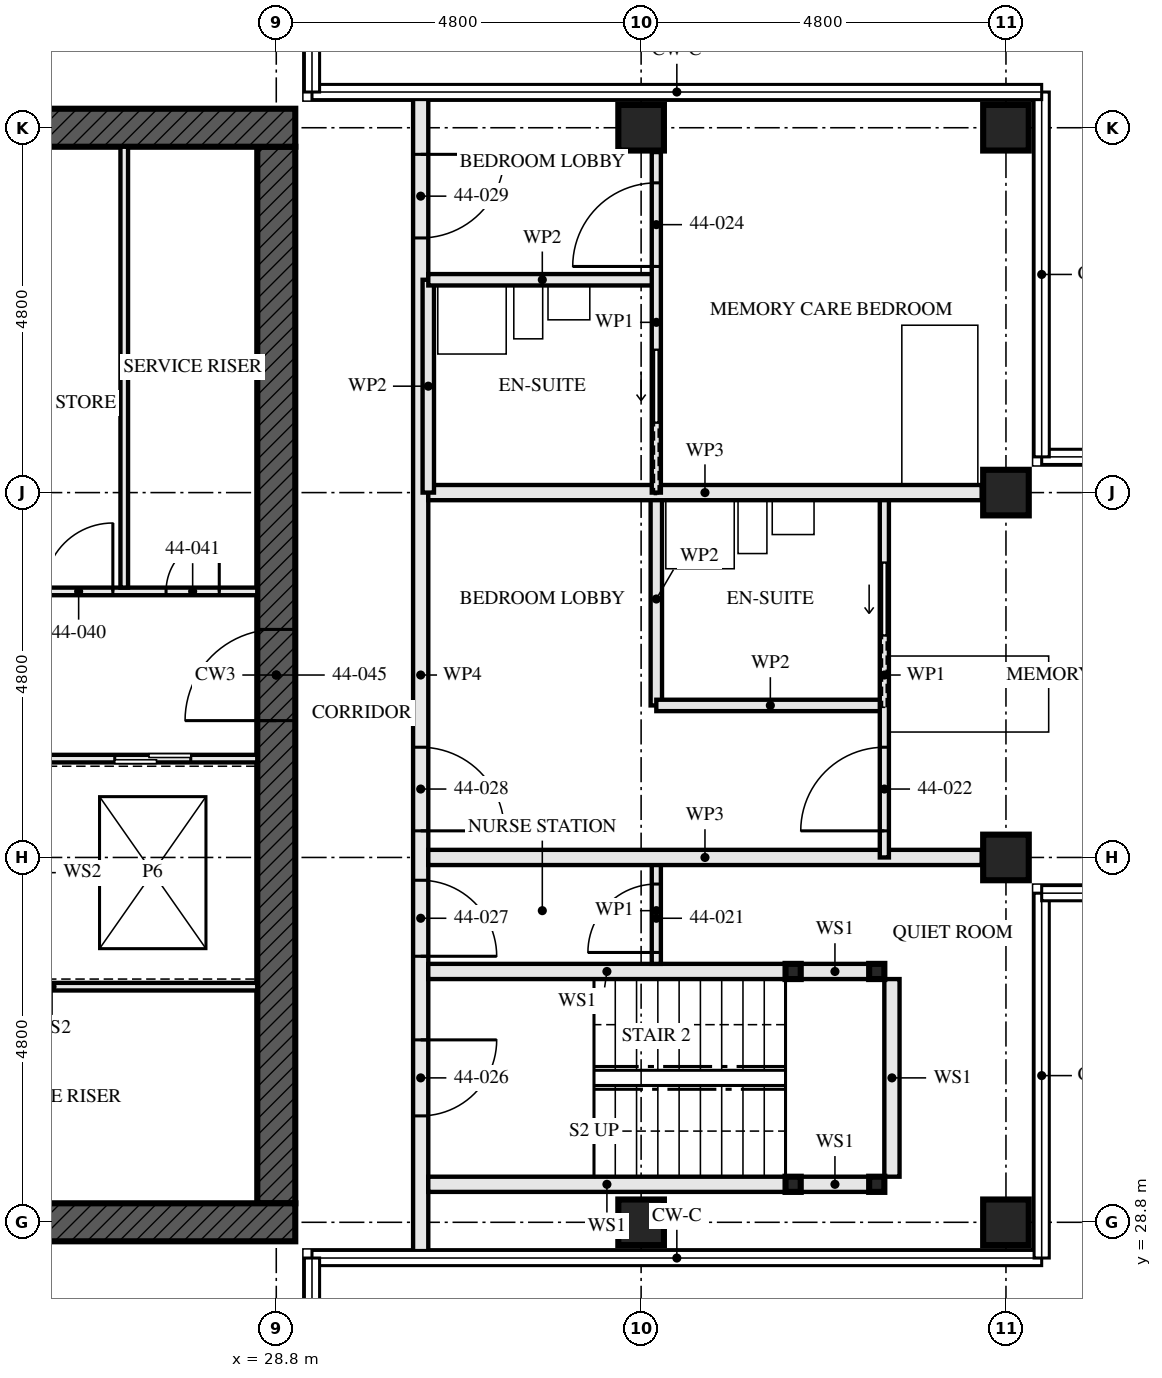
"""IFC4 building model, lengths in metres.
Left out: names, types, materials, properties, quantities, classifications, styles, units other than length and angle.
Written with IfcOpenShell. Run it as: python <this file> out.ifc"""

import sys

from ifc_helpers import new_model, si_unit, direction, frame, frame_2d, origin, origin_2d, place, context, subcontext, project, spatial, rectangle, hollow_rectangle, extrude, element, fill, save


model = new_model("IFC4")
c1 = context("Model", 3, precision=1e-05, world=origin(), true_north=direction((0.0, 1.0)))
c2 = subcontext(c1, "Body", "Model", "MODEL_VIEW")
j1 = project(units=[si_unit("LENGTHUNIT", "METRE"), si_unit("PLANEANGLEUNIT", "RADIAN")], contexts=[c1])
p1 = place(None, origin())
s1 = spatial("IfcSite", under=j1, at=p1, CompositionType="ELEMENT")
p2 = place(p1, origin())
s2 = spatial("IfcBuilding", under=s1, at=p2, CompositionType="ELEMENT")
p3 = place(p2, frame((0.0, 0.0, 162.0)))
s3 = spatial("IfcBuildingStorey", under=s2, at=p3, CompositionType="ELEMENT", Elevation=162.0)
for number, where, z_axis, x_axis in (
    (1, (33.6, 28.8, 0.0), (0.0, 0.0, 1.0), (0.0, 1.0, 0.0)),
    (2, (33.6, 43.2, 0.0), (0.0, 0.0, 1.0), (0.0, 1.0, 0.0)),
):
    element("IfcColumn", number, at=place(p3, frame(where, z_axis=z_axis, x_axis=x_axis)), inside=s3, PredefinedType="COLUMN", context=c2, shape_type="SweptSolid", body=[
        extrude(hollow_rectangle(XDim=0.6, YDim=0.6, WallThickness=0.08, at=origin_2d()), origin(), (0.0, 0.0, 1.0), 3.5),
    ])
for number, where, z_axis, x_axis in (
    (3, (38.4, 28.8, 0.0), (0.0, 0.0, 1.0), (0.0, 1.0, 0.0)),
    (4, (38.4, 33.6, 0.0), (0.0, 0.0, 1.0), (0.0, 1.0, 0.0)),
    (5, (38.4, 38.4, 0.0), (0.0, 0.0, 1.0), (0.0, 1.0, 0.0)),
    (6, (38.4, 43.2, 0.0), (0.0, 0.0, 1.0), (0.0, 1.0, 0.0)),
):
    element("IfcColumn", number, at=place(p3, frame(where, z_axis=z_axis, x_axis=x_axis)), inside=s3, PredefinedType="COLUMN", context=c2, shape_type="SweptSolid", body=[
        extrude(hollow_rectangle(XDim=0.6, YDim=0.6, WallThickness=0.06, at=origin_2d()), origin(), (0.0, 0.0, 1.0), 3.5),
    ])
p4 = place(p3, frame((14.15, 28.8, -0.17), z_axis=(0.0, 0.0, 1.0), x_axis=(1.0, 0.0, 0.0)))
e7 = element("IfcWall", 7, at=p4, inside=s3, PredefinedType="SHEAR", context=c2, shape_type="SweptSolid", body=[
    extrude(rectangle(XDim=14.9, YDim=0.5, at=frame_2d((7.45, 0.0))), origin(), (0.0, 0.0, 1.0), 3.5),
])
p5 = place(p4, frame((6.85, 0.0, 0.17)))
e8 = element("IfcOpeningElement", 8, at=p5, cuts=e7, PredefinedType="OPENING", context=c2, shape_type="SweptSolid", body=[
    extrude(rectangle(XDim=1.2, YDim=2.1, at=frame_2d((0.6, 1.05))), frame((0.0, 0.26, 0.0), z_axis=(0.0, -1.0, 0.0), x_axis=(1.0, 0.0, 0.0)), (0.0, 0.0, 1.0), 0.521),
])
p6 = place(p3, frame((29.05, 43.2, -0.17), z_axis=(0.0, 0.0, 1.0), x_axis=(-1.0, 0.0, 0.0)))
e9 = element("IfcWall", 9, at=p6, inside=s3, PredefinedType="SHEAR", context=c2, shape_type="SweptSolid", body=[
    extrude(rectangle(XDim=14.9, YDim=0.5, at=frame_2d((7.45, 0.0))), origin(), (0.0, 0.0, 1.0), 3.5),
])
p7 = place(p6, frame((6.85, 0.0, 0.17)))
e10 = element("IfcOpeningElement", 10, at=p7, cuts=e9, PredefinedType="OPENING", context=c2, shape_type="SweptSolid", body=[
    extrude(rectangle(XDim=1.2, YDim=2.1, at=frame_2d((0.6, 1.05))), frame((0.0, 0.26, 0.0), z_axis=(0.0, -1.0, 0.0), x_axis=(1.0, 0.0, 0.0)), (0.0, 0.0, 1.0), 0.521),
])
p8 = place(p3, frame((28.8, 29.05, -0.17), z_axis=(0.0, 0.0, 1.0), x_axis=(0.0, 1.0, 0.0)))
e11 = element("IfcWall", 11, at=p8, inside=s3, PredefinedType="SHEAR", context=c2, shape_type="SweptSolid", body=[
    extrude(rectangle(XDim=13.9, YDim=0.5, at=frame_2d((6.95, 0.0))), origin(), (0.0, 0.0, 1.0), 3.5),
])
p9 = place(p8, frame((6.35, 0.0, 0.17)))
e12 = element("IfcOpeningElement", 12, at=p9, cuts=e11, PredefinedType="OPENING", context=c2, shape_type="SweptSolid", body=[
    extrude(rectangle(XDim=1.2, YDim=2.1, at=frame_2d((0.6, 1.05))), frame((0.0, 0.26, 0.0), z_axis=(0.0, -1.0, 0.0), x_axis=(1.0, 0.0, 0.0)), (0.0, 0.0, 1.0), 0.521),
])
for number, where, z_axis, x_axis in (
    (13, (36.7, 29.3, 0.0), (0.0, 0.0, 1.0), (1.0, 0.0, 0.0)),
    (14, (36.7, 32.1, 0.0), (0.0, 0.0, 1.0), (1.0, 0.0, 0.0)),
    (15, (35.6, 29.3, 0.0), (0.0, 0.0, 1.0), (1.0, 0.0, 0.0)),
    (16, (35.6, 32.1, 0.0), (0.0, 0.0, 1.0), (1.0, 0.0, 0.0)),
):
    element("IfcColumn", number, at=place(p3, frame(where, z_axis=z_axis, x_axis=x_axis)), inside=s3, PredefinedType="COLUMN", context=c2, shape_type="SweptSolid", body=[
        extrude(hollow_rectangle(XDim=0.2, YDim=0.2, WallThickness=0.008, at=origin_2d()), origin(), (0.0, 0.0, 1.0), 3.33),
    ])
p10 = place(p3, frame((36.6, 29.3, 0.0), z_axis=(0.0, 0.0, 1.0), x_axis=(-1.0, 0.0, 0.0)))
e17 = element("IfcWall", 17, at=p10, inside=s3, PredefinedType="SOLIDWALL", context=c2, shape_type="SweptSolid", body=[
    extrude(rectangle(XDim=0.9, YDim=0.2, at=frame_2d((0.45, 0.0))), origin(), (0.0, 0.0, 1.0), 2.99),
])
p11 = place(p3, frame((35.5, 29.3, 0.0), z_axis=(0.0, 0.0, 1.0), x_axis=(-1.0, 0.0, 0.0)))
e18 = element("IfcWall", 18, at=p11, inside=s3, PredefinedType="SOLIDWALL", context=c2, shape_type="SweptSolid", body=[
    extrude(rectangle(XDim=4.7, YDim=0.2, at=frame_2d((2.35, 0.0))), origin(), (0.0, 0.0, 1.0), 2.99),
])
p12 = place(p3, frame((36.6, 32.1, 0.0), z_axis=(0.0, 0.0, 1.0), x_axis=(-1.0, 0.0, 0.0)))
e19 = element("IfcWall", 19, at=p12, inside=s3, PredefinedType="SOLIDWALL", context=c2, shape_type="SweptSolid", body=[
    extrude(rectangle(XDim=0.9, YDim=0.2, at=frame_2d((0.45, 0.0))), origin(), (0.0, 0.0, 1.0), 2.99),
])
p13 = place(p3, frame((35.5, 32.1, 0.0), z_axis=(0.0, 0.0, 1.0), x_axis=(-1.0, 0.0, 0.0)))
e20 = element("IfcWall", 20, at=p13, inside=s3, PredefinedType="SOLIDWALL", context=c2, shape_type="SweptSolid", body=[
    extrude(rectangle(XDim=4.7, YDim=0.2, at=frame_2d((2.35, 0.0))), origin(), (0.0, 0.0, 1.0), 2.99),
])
p14 = place(p3, frame((36.9, 29.4, 0.0), z_axis=(0.0, 0.0, 1.0), x_axis=(0.0, 1.0, 0.0)))
e21 = element("IfcWall", 21, at=p14, inside=s3, PredefinedType="SOLIDWALL", context=c2, shape_type="SweptSolid", body=[
    extrude(rectangle(XDim=2.6, YDim=0.2, at=frame_2d((1.3, 0.0))), origin(), (0.0, 0.0, 1.0), 3.33),
])
p15 = place(p3, frame((33.8, 32.2, 0.0), z_axis=(0.0, 0.0, 1.0), x_axis=(0.0, 1.0, 0.0)))
e22 = element("IfcWall", 22, at=p15, inside=s3, PredefinedType="PARTITIONING", context=c2, shape_type="SweptSolid", body=[
    extrude(rectangle(XDim=1.4, YDim=0.12, at=frame_2d((0.7, 0.0))), origin(), (0.0, 0.0, 1.0), 3.33),
])
p16 = place(p15, frame((0.15, 0.0, 0.0)))
e23 = element("IfcOpeningElement", 23, at=p16, cuts=e22, PredefinedType="OPENING", context=c2, shape_type="SweptSolid", body=[
    extrude(rectangle(XDim=0.9, YDim=2.1, at=frame_2d((0.45, 1.05))), frame((0.0, 0.071, 0.0), z_axis=(0.0, -1.0, 0.0), x_axis=(1.0, 0.0, 0.0)), (0.0, 0.0, 1.0), 0.141),
])
p17 = place(p3, frame((38.08, 33.6, 0.0), z_axis=(0.0, 0.0, 1.0), x_axis=(-1.0, 0.0, 0.0)))
e24 = element("IfcWall", 24, at=p17, inside=s3, PredefinedType="PARTITIONING", context=c2, shape_type="SweptSolid", body=[
    extrude(rectangle(XDim=7.28, YDim=0.2, at=frame_2d((3.64, 0.0))), origin(), (0.0, 0.0, 1.0), 2.55),
])
p18 = place(p3, frame((36.8, 35.6, 0.0), z_axis=(0.0, 0.0, 1.0), x_axis=(-1.0, 0.0, 0.0)))
e25 = element("IfcWall", 25, at=p18, inside=s3, PredefinedType="PARTITIONING", context=c2, shape_type="SweptSolid", body=[
    extrude(rectangle(XDim=3.0, YDim=0.15, at=frame_2d((1.5, 0.0))), origin(), (0.0, 0.0, 1.0), 3.33),
])
p19 = place(p3, frame((33.8, 35.6, 0.0), z_axis=(0.0, 0.0, 1.0), x_axis=(0.0, 1.0, 0.0)))
e26 = element("IfcWall", 26, at=p19, inside=s3, PredefinedType="PARTITIONING", context=c2, shape_type="SweptSolid", body=[
    extrude(rectangle(XDim=2.8, YDim=0.15, at=frame_2d((1.4, 0.0))), origin(), (0.0, 0.0, 1.0), 3.33),
])
p20 = place(p3, frame((36.8, 33.6, 0.0), z_axis=(0.0, 0.0, 1.0), x_axis=(0.0, 1.0, 0.0)))
e27 = element("IfcWall", 27, at=p20, inside=s3, PredefinedType="PARTITIONING", context=c2, shape_type="SweptSolid", body=[
    extrude(rectangle(XDim=4.8, YDim=0.12, at=frame_2d((2.4, 0.0))), origin(), (0.0, 0.0, 1.0), 3.33),
])
p21 = place(p20, frame((0.35, 0.0, 0.0)))
e28 = element("IfcOpeningElement", 28, at=p21, cuts=e27, PredefinedType="OPENING", context=c2, shape_type="SweptSolid", body=[
    extrude(rectangle(XDim=1.1, YDim=2.1, at=frame_2d((0.55, 1.05))), frame((0.0, 0.071, 0.0), z_axis=(0.0, -1.0, 0.0), x_axis=(1.0, 0.0, 0.0)), (0.0, 0.0, 1.0), 0.141),
])
p22 = place(p20, frame((2.925, 0.0, 0.0)))
e29 = element("IfcOpeningElement", 29, at=p22, cuts=e27, PredefinedType="OPENING", context=c2, shape_type="SweptSolid", body=[
    extrude(rectangle(XDim=0.95, YDim=2.1, at=frame_2d((0.475, 1.05))), frame((0.0, 0.071, 0.0), z_axis=(0.0, -1.0, 0.0), x_axis=(1.0, 0.0, 0.0)), (0.0, 0.0, 1.0), 0.141),
])
p23 = place(p3, frame((38.08, 38.4, 0.0), z_axis=(0.0, 0.0, 1.0), x_axis=(-1.0, 0.0, 0.0)))
e30 = element("IfcWall", 30, at=p23, inside=s3, PredefinedType="PARTITIONING", context=c2, shape_type="SweptSolid", body=[
    extrude(rectangle(XDim=7.28, YDim=0.2, at=frame_2d((3.64, 0.0))), origin(), (0.0, 0.0, 1.0), 2.55),
])
p24 = place(p3, frame((33.8, 41.2, 0.0), z_axis=(0.0, 0.0, 1.0), x_axis=(-1.0, 0.0, 0.0)))
e31 = element("IfcWall", 31, at=p24, inside=s3, PredefinedType="PARTITIONING", context=c2, shape_type="SweptSolid", body=[
    extrude(rectangle(XDim=3.0, YDim=0.15, at=frame_2d((1.5, 0.0))), origin(), (0.0, 0.0, 1.0), 3.33),
])
p25 = place(p3, frame((30.8, 38.4, 0.0), z_axis=(0.0, 0.0, 1.0), x_axis=(0.0, 1.0, 0.0)))
e32 = element("IfcWall", 32, at=p25, inside=s3, PredefinedType="PARTITIONING", context=c2, shape_type="SweptSolid", body=[
    extrude(rectangle(XDim=2.8, YDim=0.15, at=frame_2d((1.4, 0.0))), origin(), (0.0, 0.0, 1.0), 3.33),
])
p26 = place(p3, frame((33.8, 38.4, 0.0), z_axis=(0.0, 0.0, 1.0), x_axis=(0.0, 1.0, 0.0)))
e33 = element("IfcWall", 33, at=p26, inside=s3, PredefinedType="PARTITIONING", context=c2, shape_type="SweptSolid", body=[
    extrude(rectangle(XDim=4.48, YDim=0.12, at=frame_2d((2.24, 0.0))), origin(), (0.0, 0.0, 1.0), 3.33),
])
p27 = place(p26, frame((2.975, 0.0, 0.0)))
e34 = element("IfcOpeningElement", 34, at=p27, cuts=e33, PredefinedType="OPENING", context=c2, shape_type="SweptSolid", body=[
    extrude(rectangle(XDim=1.1, YDim=2.1, at=frame_2d((0.55, 1.05))), frame((0.0, 0.071, 0.0), z_axis=(0.0, -1.0, 0.0), x_axis=(1.0, 0.0, 0.0)), (0.0, 0.0, 1.0), 0.141),
])
p28 = place(p26, frame((0.925, 0.0, 0.0)))
e35 = element("IfcOpeningElement", 35, at=p28, cuts=e33, PredefinedType="OPENING", context=c2, shape_type="SweptSolid", body=[
    extrude(rectangle(XDim=0.95, YDim=2.1, at=frame_2d((0.475, 1.05))), frame((0.0, 0.071, 0.0), z_axis=(0.0, -1.0, 0.0), x_axis=(1.0, 0.0, 0.0)), (0.0, 0.0, 1.0), 0.141),
])
p29 = place(p3, frame((30.7, 28.35, 0.0), z_axis=(0.0, 0.0, 1.0), x_axis=(0.0, 1.0, 0.0)))
e36 = element("IfcWall", 36, at=p29, inside=s3, PredefinedType="PARTITIONING", context=c2, shape_type="SweptSolid", body=[
    extrude(rectangle(XDim=15.3, YDim=0.2, at=frame_2d((7.65, 0.0))), origin(), (0.0, 0.0, 1.0), 2.32),
])
p30 = place(p29, frame((1.85, 0.0, 0.0)))
e37 = element("IfcOpeningElement", 37, at=p30, cuts=e36, PredefinedType="OPENING", context=c2, shape_type="SweptSolid", body=[
    extrude(rectangle(XDim=1.0, YDim=2.1, at=frame_2d((0.5, 1.05))), frame((0.0, 0.111, 0.0), z_axis=(0.0, -1.0, 0.0), x_axis=(1.0, 0.0, 0.0)), (0.0, 0.0, 1.0), 0.221),
])
p31 = place(p29, frame((3.95, 0.0, 0.0)))
e38 = element("IfcOpeningElement", 38, at=p31, cuts=e36, PredefinedType="OPENING", context=c2, shape_type="SweptSolid", body=[
    extrude(rectangle(XDim=1.0, YDim=2.1, at=frame_2d((0.5, 1.05))), frame((0.0, 0.111, 0.0), z_axis=(0.0, -1.0, 0.0), x_axis=(1.0, 0.0, 0.0)), (0.0, 0.0, 1.0), 0.221),
])
p32 = place(p29, frame((5.6, 0.0, 0.0)))
e39 = element("IfcOpeningElement", 39, at=p32, cuts=e36, PredefinedType="OPENING", context=c2, shape_type="SweptSolid", body=[
    extrude(rectangle(XDim=1.1, YDim=2.1, at=frame_2d((0.55, 1.05))), frame((0.0, 0.111, 0.0), z_axis=(0.0, -1.0, 0.0), x_axis=(1.0, 0.0, 0.0)), (0.0, 0.0, 1.0), 0.221),
])
p33 = place(p29, frame((13.4, 0.0, 0.0)))
e40 = element("IfcOpeningElement", 40, at=p33, cuts=e36, PredefinedType="OPENING", context=c2, shape_type="SweptSolid", body=[
    extrude(rectangle(XDim=1.1, YDim=2.1, at=frame_2d((0.55, 1.05))), frame((0.0, 0.111, 0.0), z_axis=(0.0, -1.0, 0.0), x_axis=(1.0, 0.0, 0.0)), (0.0, 0.0, 1.0), 0.221),
])
p34 = place(p3, frame((26.8, 37.15, 0.0), z_axis=(0.0, 0.0, 1.0), x_axis=(0.0, 1.0, 0.0)))
e41 = element("IfcWall", 41, at=p34, inside=s3, PredefinedType="SOLIDWALL", context=c2, shape_type="SweptSolid", body=[
    extrude(rectangle(XDim=5.8, YDim=0.1, at=frame_2d((2.9, 0.0))), origin(), (0.0, 0.0, 1.0), 3.33),
])
p35 = place(p3, frame((23.05, 34.9, 0.0), z_axis=(0.0, 0.0, 1.0), x_axis=(1.0, 0.0, 0.0)))
e42 = element("IfcWall", 42, at=p35, inside=s3, PredefinedType="SOLIDWALL", context=c2, shape_type="SweptSolid", body=[
    extrude(rectangle(XDim=5.5, YDim=0.1, at=frame_2d((2.75, 0.0))), origin(), (0.0, 0.0, 1.0), 3.33),
])
p36 = place(p35, frame((0.85, 0.0, 0.0)))
e43 = element("IfcOpeningElement", 43, at=p36, cuts=e42, PredefinedType="OPENING", context=c2, shape_type="SweptSolid", body=[
    extrude(rectangle(XDim=1.0, YDim=2.1, at=frame_2d((0.5, 1.05))), frame((0.0, 0.061, 0.0), z_axis=(0.0, -1.0, 0.0), x_axis=(1.0, 0.0, 0.0)), (0.0, 0.0, 1.0), 0.121),
])
p37 = place(p35, frame((3.625, 0.0, 0.0)))
e44 = element("IfcOpeningElement", 44, at=p37, cuts=e42, PredefinedType="OPENING", context=c2, shape_type="SweptSolid", body=[
    extrude(rectangle(XDim=1.0, YDim=2.1, at=frame_2d((0.5, 1.05))), frame((0.0, 0.061, 0.0), z_axis=(0.0, -1.0, 0.0), x_axis=(1.0, 0.0, 0.0)), (0.0, 0.0, 1.0), 0.121),
])
p38 = place(p3, frame((22.65, 37.1, 0.0), z_axis=(0.0, 0.0, 1.0), x_axis=(1.0, 0.0, 0.0)))
e45 = element("IfcWall", 45, at=p38, inside=s3, PredefinedType="SOLIDWALL", context=c2, shape_type="SweptSolid", body=[
    extrude(rectangle(XDim=5.9, YDim=0.1, at=frame_2d((2.95, 0.0))), origin(), (0.0, 0.0, 1.0), 3.33),
])
p39 = place(p38, frame((3.1, 0.0, 0.0)))
e46 = element("IfcOpeningElement", 46, at=p39, cuts=e45, PredefinedType="OPENING", context=c2, shape_type="SweptSolid", body=[
    extrude(rectangle(XDim=0.9, YDim=2.1, at=frame_2d((0.45, 1.05))), frame((0.0, 0.061, 0.0), z_axis=(0.0, -1.0, 0.0), x_axis=(1.0, 0.0, 0.0)), (0.0, 0.0, 1.0), 0.121),
])
p40 = place(p38, frame((4.7, 0.0, 0.0)))
e47 = element("IfcOpeningElement", 47, at=p40, cuts=e45, PredefinedType="OPENING", context=c2, shape_type="SweptSolid", body=[
    extrude(rectangle(XDim=0.7, YDim=2.1, at=frame_2d((0.35, 1.05))), frame((0.0, 0.061, 0.0), z_axis=(0.0, -1.0, 0.0), x_axis=(1.0, 0.0, 0.0)), (0.0, 0.0, 1.0), 0.121),
])
p41 = place(p3, frame((23.15, 31.9, 0.0), z_axis=(0.0, 0.0, 1.0), x_axis=(1.0, 0.0, 0.0)))
e48 = element("IfcWall", 48, at=p41, inside=s3, PredefinedType="SOLIDWALL", context=c2, shape_type="SweptSolid", body=[
    extrude(rectangle(XDim=5.4, YDim=0.1, at=frame_2d((2.7, 0.0))), origin(), (0.0, 0.0, 1.0), 3.33),
])
p42 = place(p16, origin())
e49 = element("IfcDoor", 49, at=p42, inside=s3, OperationType="SINGLE_SWING_RIGHT", PredefinedType="DOOR", context=c2, shape_type="SweptSolid", body=[
    extrude(rectangle(XDim=0.9, YDim=2.1, at=frame_2d((0.45, 1.05))), frame((0.0, 0.022, 0.0), z_axis=(0.0, -1.0, 0.0), x_axis=(1.0, 0.0, 0.0)), (0.0, 0.0, 1.0), 0.044),
])
fill(e23, e49)
p43 = place(p21, origin())
e50 = element("IfcDoor", 50, at=p43, inside=s3, OperationType="SINGLE_SWING_RIGHT", PredefinedType="DOOR", context=c2, shape_type="SweptSolid", body=[
    extrude(rectangle(XDim=1.1, YDim=2.1, at=frame_2d((0.55, 1.05))), frame((0.0, 0.022, 0.0), z_axis=(0.0, -1.0, 0.0), x_axis=(1.0, 0.0, 0.0)), (0.0, 0.0, 1.0), 0.044),
])
fill(e28, e50)
p44 = place(p22, origin())
e51 = element("IfcDoor", 51, at=p44, inside=s3, OperationType="SLIDING_TO_RIGHT", PredefinedType="DOOR", context=c2, shape_type="SweptSolid", body=[
    extrude(rectangle(XDim=0.95, YDim=2.1, at=frame_2d((0.475, 1.05))), frame((0.0, 0.022, 0.0), z_axis=(0.0, -1.0, 0.0), x_axis=(1.0, 0.0, 0.0)), (0.0, 0.0, 1.0), 0.044),
])
fill(e29, e51)
p45 = place(p27, origin())
e52 = element("IfcDoor", 52, at=p45, inside=s3, OperationType="SINGLE_SWING_RIGHT", PredefinedType="DOOR", context=c2, shape_type="SweptSolid", body=[
    extrude(rectangle(XDim=1.1, YDim=2.1, at=frame_2d((0.55, 1.05))), frame((0.0, 0.022, 0.0), z_axis=(0.0, -1.0, 0.0), x_axis=(1.0, 0.0, 0.0)), (0.0, 0.0, 1.0), 0.044),
])
fill(e34, e52)
p46 = place(p28, origin())
e53 = element("IfcDoor", 53, at=p46, inside=s3, OperationType="SLIDING_TO_RIGHT", PredefinedType="DOOR", context=c2, shape_type="SweptSolid", body=[
    extrude(rectangle(XDim=0.95, YDim=2.1, at=frame_2d((0.475, 1.05))), frame((0.0, 0.022, 0.0), z_axis=(0.0, -1.0, 0.0), x_axis=(1.0, 0.0, 0.0)), (0.0, 0.0, 1.0), 0.044),
])
fill(e35, e53)
p47 = place(p30, frame((1.0, 0.0, 0.0), z_axis=(0.0, 0.0, 1.0), x_axis=(-1.0, 0.0, 0.0)))
e54 = element("IfcDoor", 54, at=p47, inside=s3, OperationType="SINGLE_SWING_RIGHT", PredefinedType="DOOR", context=c2, shape_type="SweptSolid", body=[
    extrude(rectangle(XDim=1.0, YDim=2.1, at=frame_2d((0.5, 1.05))), frame((0.0, 0.032, 0.0), z_axis=(0.0, -1.0, 0.0), x_axis=(1.0, 0.0, 0.0)), (0.0, 0.0, 1.0), 0.064),
])
fill(e37, e54)
p48 = place(p31, frame((1.0, 0.0, 0.0), z_axis=(0.0, 0.0, 1.0), x_axis=(-1.0, 0.0, 0.0)))
e55 = element("IfcDoor", 55, at=p48, inside=s3, OperationType="SINGLE_SWING_LEFT", PredefinedType="DOOR", context=c2, shape_type="SweptSolid", body=[
    extrude(rectangle(XDim=1.0, YDim=2.1, at=frame_2d((0.5, 1.05))), frame((0.0, 0.027, 0.0), z_axis=(0.0, -1.0, 0.0), x_axis=(1.0, 0.0, 0.0)), (0.0, 0.0, 1.0), 0.054),
])
fill(e38, e55)
p49 = place(p32, frame((1.1, 0.0, 0.0), z_axis=(0.0, 0.0, 1.0), x_axis=(-1.0, 0.0, 0.0)))
e56 = element("IfcDoor", 56, at=p49, inside=s3, OperationType="SINGLE_SWING_LEFT", PredefinedType="DOOR", context=c2, shape_type="SweptSolid", body=[
    extrude(rectangle(XDim=1.1, YDim=2.1, at=frame_2d((0.55, 1.05))), frame((0.0, 0.027, 0.0), z_axis=(0.0, -1.0, 0.0), x_axis=(1.0, 0.0, 0.0)), (0.0, 0.0, 1.0), 0.054),
])
fill(e39, e56)
p50 = place(p33, frame((1.1, 0.0, 0.0), z_axis=(0.0, 0.0, 1.0), x_axis=(-1.0, 0.0, 0.0)))
e57 = element("IfcDoor", 57, at=p50, inside=s3, OperationType="SINGLE_SWING_RIGHT", PredefinedType="DOOR", context=c2, shape_type="SweptSolid", body=[
    extrude(rectangle(XDim=1.1, YDim=2.1, at=frame_2d((0.55, 1.05))), frame((0.0, 0.027, 0.0), z_axis=(0.0, -1.0, 0.0), x_axis=(1.0, 0.0, 0.0)), (0.0, 0.0, 1.0), 0.054),
])
fill(e40, e57)
p51 = place(p37, origin())
e58 = element("IfcDoor", 58, at=p51, inside=s3, OperationType="SLIDING_TO_LEFT", PredefinedType="DOOR", context=c2, shape_type="SweptSolid", body=[
    extrude(rectangle(XDim=1.0, YDim=2.1, at=frame_2d((0.5, 1.05))), frame((0.0, 0.05, 0.0), z_axis=(0.0, -1.0, 0.0), x_axis=(1.0, 0.0, 0.0)), (0.0, 0.0, 1.0), 0.1),
])
fill(e44, e58)
p52 = place(p39, origin())
e59 = element("IfcDoor", 59, at=p52, inside=s3, OperationType="SINGLE_SWING_LEFT", PredefinedType="DOOR", context=c2, shape_type="SweptSolid", body=[
    extrude(rectangle(XDim=0.9, YDim=2.1, at=frame_2d((0.45, 1.05))), frame((0.0, 0.027, 0.0), z_axis=(0.0, -1.0, 0.0), x_axis=(1.0, 0.0, 0.0)), (0.0, 0.0, 1.0), 0.054),
])
fill(e46, e59)
p53 = place(p40, origin())
e60 = element("IfcDoor", 60, at=p53, inside=s3, OperationType="SINGLE_SWING_LEFT", PredefinedType="DOOR", context=c2, shape_type="SweptSolid", body=[
    extrude(rectangle(XDim=0.7, YDim=2.1, at=frame_2d((0.35, 1.05))), frame((0.0, 0.027, 0.0), z_axis=(0.0, -1.0, 0.0), x_axis=(1.0, 0.0, 0.0)), (0.0, 0.0, 1.0), 0.054),
])
fill(e47, e60)
p54 = place(p9, origin())
e61 = element("IfcDoor", 61, at=p54, inside=s3, OperationType="SINGLE_SWING_LEFT", PredefinedType="DOOR", context=c2, shape_type="SweptSolid", body=[
    extrude(rectangle(XDim=1.2, YDim=2.1, at=frame_2d((0.6, 1.05))), frame((0.0, 0.027, 0.0), z_axis=(0.0, -1.0, 0.0), x_axis=(1.0, 0.0, 0.0)), (0.0, 0.0, 1.0), 0.054),
])
fill(e12, e61)
save(model, sys.argv[1])
